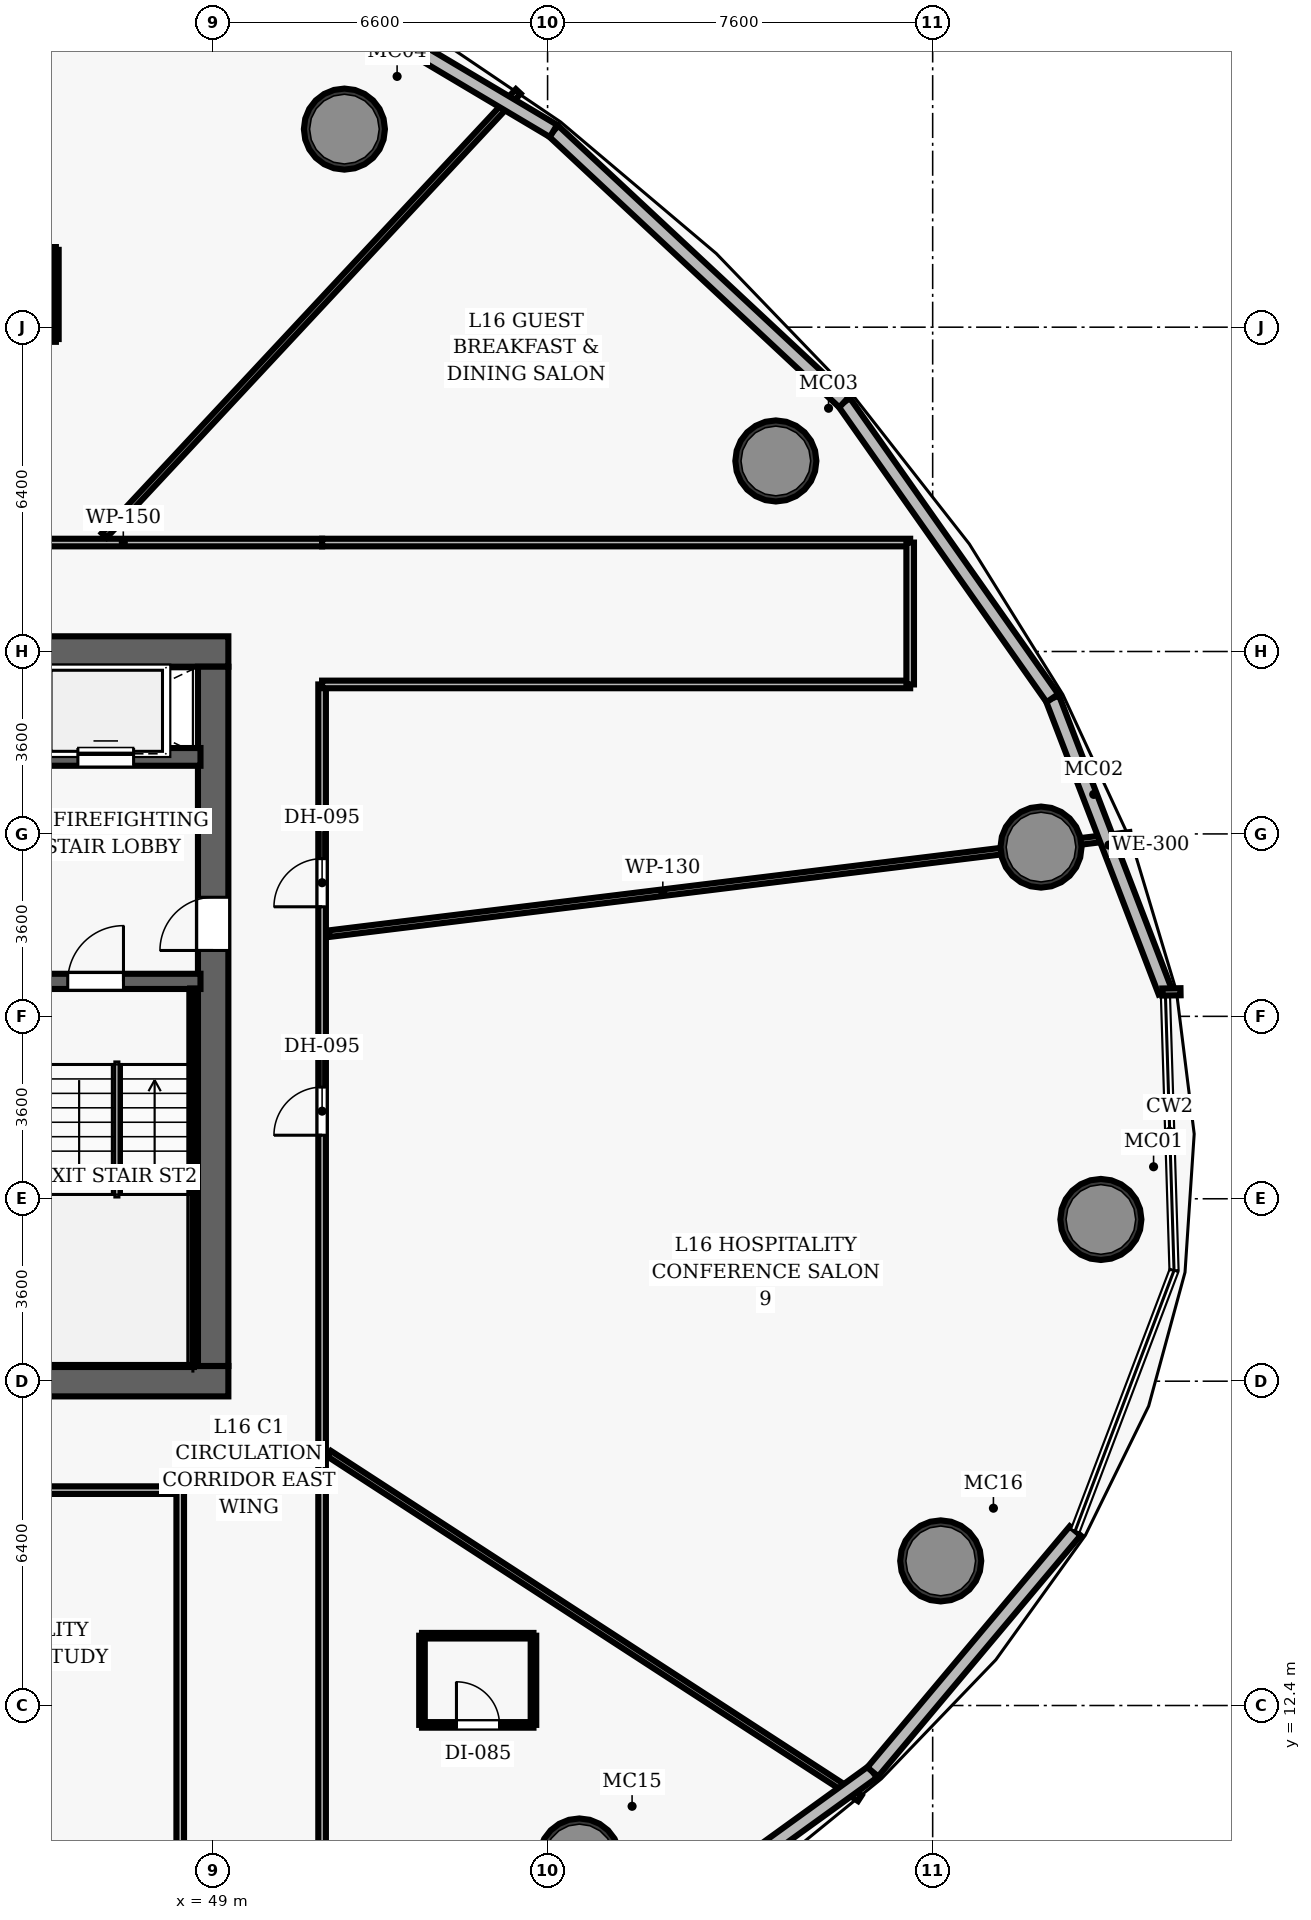
"""IFC4 building model, lengths in metres.
Left out: names, types, materials, properties, quantities, classifications, styles, units other than length and angle.
Written with IfcOpenShell. Run it as: python <this file> out.ifc"""

import sys

from ifc_helpers import new_model, si_unit, direction, frame, frame_2d, origin, origin_2d, place, context, subcontext, project, spatial, rectangle, hollow_circle, extrude, element, fill, save


model = new_model("IFC4")
c1 = context("Model", 3, precision=1e-05, world=origin(), true_north=direction((0.0, 1.0)))
c2 = subcontext(c1, "Body", "Model", "MODEL_VIEW")
j1 = project(units=[si_unit("LENGTHUNIT", "METRE"), si_unit("PLANEANGLEUNIT", "RADIAN")], contexts=[c1])
p1 = place(None, origin())
s1 = spatial("IfcSite", under=j1, at=p1, CompositionType="ELEMENT")
p2 = place(p1, origin())
s2 = spatial("IfcBuilding", under=s1, at=p2, CompositionType="ELEMENT")
p3 = place(p2, frame((0.0, 0.0, 72.9)))
s3 = spatial("IfcBuildingStorey", under=s2, at=p3, CompositionType="ELEMENT", Elevation=72.9)
p4 = place(p3, frame((26.7, 18.8, 0.0), z_axis=(0.0, 0.0, 1.0), x_axis=(1.0, 0.0, 0.0)))
e1 = element("IfcWall", 1, at=p4, inside=s3, PredefinedType="SHEAR", context=c2, shape_type="SweptSolid", body=[
    extrude(rectangle(XDim=22.6, YDim=0.6, at=frame_2d((11.3, 0.0))), origin(), (0.0, 0.0, 1.0), 3.5),
])
p5 = place(p4, frame((14.52, 0.0, 0.0)))
e2 = element("IfcOpeningElement", 2, at=p5, cuts=e1, PredefinedType="OPENING", context=c2, shape_type="SweptSolid", body=[
    extrude(rectangle(XDim=1.05, YDim=2.15, at=frame_2d((0.525, 1.075))), frame((0.0, 0.31, 0.0), z_axis=(0.0, -1.0, 0.0), x_axis=(1.0, 0.0, 0.0)), (0.0, 0.0, 1.0), 0.62),
])
p6 = place(p3, frame((26.7, 33.2, 0.0), z_axis=(0.0, 0.0, 1.0), x_axis=(1.0, 0.0, 0.0)))
e3 = element("IfcWall", 3, at=p6, inside=s3, PredefinedType="SHEAR", context=c2, shape_type="SweptSolid", body=[
    extrude(rectangle(XDim=22.6, YDim=0.6, at=frame_2d((11.3, 0.0))), origin(), (0.0, 0.0, 1.0), 3.5),
])
p7 = place(p6, frame((4.62, 0.0, 0.0)))
e4 = element("IfcOpeningElement", 4, at=p7, cuts=e3, PredefinedType="OPENING", context=c2, shape_type="SweptSolid", body=[
    extrude(rectangle(XDim=1.05, YDim=2.15, at=frame_2d((0.525, 1.075))), frame((0.0, 0.31, 0.0), z_axis=(0.0, -1.0, 0.0), x_axis=(1.0, 0.0, 0.0)), (0.0, 0.0, 1.0), 0.62),
])
p8 = place(p6, frame((14.52, 0.0, 0.0)))
e5 = element("IfcOpeningElement", 5, at=p8, cuts=e3, PredefinedType="OPENING", context=c2, shape_type="SweptSolid", body=[
    extrude(rectangle(XDim=1.05, YDim=2.15, at=frame_2d((0.525, 1.075))), frame((0.0, 0.31, 0.0), z_axis=(0.0, -1.0, 0.0), x_axis=(1.0, 0.0, 0.0)), (0.0, 0.0, 1.0), 0.62),
])
p9 = place(p3, frame((49.0, 19.1, 0.0), z_axis=(0.0, 0.0, 1.0), x_axis=(0.0, 1.0, 0.0)))
e6 = element("IfcWall", 6, at=p9, inside=s3, PredefinedType="SHEAR", context=c2, shape_type="SweptSolid", body=[
    extrude(rectangle(XDim=13.8, YDim=0.6, at=frame_2d((6.9, 0.0))), origin(), (0.0, 0.0, 1.0), 3.5),
])
p10 = place(p9, frame((8.2, 0.0, 0.0)))
e7 = element("IfcOpeningElement", 7, at=p10, cuts=e6, PredefinedType="OPENING", context=c2, shape_type="SweptSolid", body=[
    extrude(rectangle(XDim=1.05, YDim=2.15, at=frame_2d((0.525, 1.075))), frame((0.0, 0.31, 0.0), z_axis=(0.0, -1.0, 0.0), x_axis=(1.0, 0.0, 0.0)), (0.0, 0.0, 1.0), 0.62),
])
for number, where, z_axis, x_axis in (
    (8, (66.52, 21.992, 0.0), (0.0, 0.0, 1.0), (1.0, 0.0, 0.0)),
    (9, (65.339, 29.34, 0.0), (0.0, 0.0, 1.0), (1.0, 0.0, 0.0)),
    (10, (60.105, 36.96, 0.0), (0.0, 0.0, 1.0), (1.0, 0.0, 0.0)),
    (11, (51.59, 43.509, 0.0), (0.0, 0.0, 1.0), (1.0, 0.0, 0.0)),
    (12, (56.228, 9.371, 0.0), (0.0, 0.0, 1.0), (1.0, 0.0, 0.0)),
    (13, (63.359, 15.254, 0.0), (0.0, 0.0, 1.0), (1.0, 0.0, 0.0)),
):
    element("IfcColumn", number, at=place(p3, frame(where, z_axis=z_axis, x_axis=x_axis)), inside=s3, PredefinedType="COLUMN", context=c2, shape_type="SweptSolid", body=[
        extrude(hollow_circle(Radius=0.8, WallThickness=0.06, at=origin_2d()), origin(), (0.0, 0.0, 1.0), 3.5),
    ])
p11 = place(p3, frame((45.08, 26.69, 0.0), z_axis=(0.0, 0.0, 1.0), x_axis=(1.0, 0.0, 0.0)))
e14 = element("IfcWall", 14, at=p11, inside=s3, PredefinedType="SHEAR", context=c2, shape_type="SweptSolid", body=[
    extrude(rectangle(XDim=3.67, YDim=0.3, at=frame_2d((1.835, 0.0))), origin(), (0.0, 0.0, 1.0), 3.5),
])
p12 = place(p11, frame((1.05, 0.0, 0.0)))
e15 = element("IfcOpeningElement", 15, at=p12, cuts=e14, PredefinedType="OPENING", context=c2, shape_type="SweptSolid", body=[
    extrude(rectangle(XDim=1.1, YDim=2.15, at=frame_2d((0.55, 1.075))), frame((0.0, 0.16, 0.0), z_axis=(0.0, -1.0, 0.0), x_axis=(1.0, 0.0, 0.0)), (0.0, 0.0, 1.0), 0.32),
])
p13 = place(p3, frame((48.605, 19.1, 0.0), z_axis=(0.0, 0.0, 1.0), x_axis=(0.0, 1.0, 0.0)))
e16 = element("IfcWall", 16, at=p13, inside=s3, PredefinedType="SHEAR", context=c2, shape_type="SweptSolid", body=[
    extrude(rectangle(XDim=7.45, YDim=0.12, at=frame_2d((3.725, 0.0))), origin(), (0.0, 0.0, 1.0), 3.5),
])
p14 = place(p3, frame((45.51, 19.16, 0.0), z_axis=(0.0, 0.0, 1.0), x_axis=(1.0, 0.0, 0.0)))
e17 = element("IfcWall", 17, at=p14, inside=s3, PredefinedType="SHEAR", context=c2, shape_type="SweptSolid", body=[
    extrude(rectangle(XDim=3.095, YDim=0.12, at=frame_2d((1.547, 0.0))), origin(), (0.0, 0.0, 1.0), 3.5),
])
p15 = place(p3, frame((45.08, 31.12, 0.0), z_axis=(0.0, 0.0, 1.0), x_axis=(1.0, 0.0, 0.0)))
e18 = element("IfcWall", 18, at=p15, inside=s3, PredefinedType="SHEAR", context=c2, shape_type="SweptSolid", body=[
    extrude(rectangle(XDim=3.67, YDim=0.35, at=frame_2d((1.835, 0.0))), origin(), (0.0, 0.0, 1.0), 2.6),
])
p16 = place(p15, frame((1.25, 0.0, 0.0)))
e19 = element("IfcOpeningElement", 19, at=p16, cuts=e18, PredefinedType="OPENING", context=c2, shape_type="SweptSolid", body=[
    extrude(rectangle(XDim=1.1, YDim=2.15, at=frame_2d((0.55, 1.075))), frame((0.0, 0.185, 0.0), z_axis=(0.0, -1.0, 0.0), x_axis=(1.0, 0.0, 0.0)), (0.0, 0.0, 1.0), 0.37),
])
p17 = place(p3, frame((27.65, 35.35, 0.0), z_axis=(0.0, 0.0, 1.0), x_axis=(1.0, 0.0, 0.0)))
e20 = element("IfcWall", 20, at=p17, inside=s3, PredefinedType="PARTITIONING", context=c2, shape_type="SweptSolid", body=[
    extrude(rectangle(XDim=23.5, YDim=0.15, at=frame_2d((11.75, 0.0))), origin(), (0.0, 0.0, 1.0), 2.6),
])
p18 = place(p17, frame((14.553, 0.0, 0.0)))
e21 = element("IfcOpeningElement", 21, at=p18, cuts=e20, PredefinedType="OPENING", context=c2, shape_type="SweptSolid", body=[
    extrude(rectangle(XDim=0.95, YDim=2.15, at=frame_2d((0.475, 1.075))), frame((0.0, 0.085, 0.0), z_axis=(0.0, -1.0, 0.0), x_axis=(1.0, 0.0, 0.0)), (0.0, 0.0, 1.0), 0.17),
])
p19 = place(p17, frame((7.784, 0.0, 0.0)))
e22 = element("IfcOpeningElement", 22, at=p19, cuts=e20, PredefinedType="OPENING", context=c2, shape_type="SweptSolid", body=[
    extrude(rectangle(XDim=0.95, YDim=2.15, at=frame_2d((0.475, 1.075))), frame((0.0, 0.085, 0.0), z_axis=(0.0, -1.0, 0.0), x_axis=(1.0, 0.0, 0.0)), (0.0, 0.0, 1.0), 0.17),
])
p20 = place(p3, frame((24.85, 16.65, 0.0), z_axis=(0.0, 0.0, 1.0), x_axis=(1.0, 0.0, 0.0)))
e23 = element("IfcWall", 23, at=p20, inside=s3, PredefinedType="PARTITIONING", context=c2, shape_type="SweptSolid", body=[
    extrude(rectangle(XDim=23.5, YDim=0.15, at=frame_2d((11.75, 0.0))), origin(), (0.0, 0.0, 1.0), 2.6),
])
p21 = place(p20, frame((6.595, 0.0, 0.0)))
e24 = element("IfcOpeningElement", 24, at=p21, cuts=e23, PredefinedType="OPENING", context=c2, shape_type="SweptSolid", body=[
    extrude(rectangle(XDim=0.95, YDim=2.15, at=frame_2d((0.475, 1.075))), frame((0.0, 0.085, 0.0), z_axis=(0.0, -1.0, 0.0), x_axis=(1.0, 0.0, 0.0)), (0.0, 0.0, 1.0), 0.17),
])
p22 = place(p20, frame((13.99, 0.0, 0.0)))
e25 = element("IfcOpeningElement", 25, at=p22, cuts=e23, PredefinedType="OPENING", context=c2, shape_type="SweptSolid", body=[
    extrude(rectangle(XDim=0.95, YDim=2.15, at=frame_2d((0.475, 1.075))), frame((0.0, 0.085, 0.0), z_axis=(0.0, -1.0, 0.0), x_axis=(1.0, 0.0, 0.0)), (0.0, 0.0, 1.0), 0.17),
])
p23 = place(p20, frame((17.211, 0.0, 0.0)))
e26 = element("IfcOpeningElement", 26, at=p23, cuts=e23, PredefinedType="OPENING", context=c2, shape_type="SweptSolid", body=[
    extrude(rectangle(XDim=0.95, YDim=2.15, at=frame_2d((0.475, 1.075))), frame((0.0, 0.085, 0.0), z_axis=(0.0, -1.0, 0.0), x_axis=(1.0, 0.0, 0.0)), (0.0, 0.0, 1.0), 0.17),
])
p24 = place(p3, frame((51.15, 16.65, 0.0), z_axis=(0.0, 0.0, 1.0), x_axis=(0.0, 1.0, 0.0)))
e27 = element("IfcWall", 27, at=p24, inside=s3, PredefinedType="PARTITIONING", context=c2, shape_type="SweptSolid", body=[
    extrude(rectangle(XDim=15.9, YDim=0.15, at=frame_2d((7.95, 0.0))), origin(), (0.0, 0.0, 1.0), 2.6),
])
p25 = place(p24, frame((11.512, 0.0, 0.0)))
e28 = element("IfcOpeningElement", 28, at=p25, cuts=e27, PredefinedType="OPENING", context=c2, shape_type="SweptSolid", body=[
    extrude(rectangle(XDim=0.95, YDim=2.15, at=frame_2d((0.475, 1.075))), frame((0.0, 0.085, 0.0), z_axis=(0.0, -1.0, 0.0), x_axis=(1.0, 0.0, 0.0)), (0.0, 0.0, 1.0), 0.17),
])
p26 = place(p24, frame((7.004, 0.0, 0.0)))
e29 = element("IfcOpeningElement", 29, at=p26, cuts=e27, PredefinedType="OPENING", context=c2, shape_type="SweptSolid", body=[
    extrude(rectangle(XDim=0.95, YDim=2.15, at=frame_2d((0.475, 1.075))), frame((0.0, 0.085, 0.0), z_axis=(0.0, -1.0, 0.0), x_axis=(1.0, 0.0, 0.0)), (0.0, 0.0, 1.0), 0.17),
])
for number, where, z_axis, x_axis in (
    (30, (51.15, 35.35, 0.0), (0.0, 0.0, 1.0), (1.0, 0.0, 0.0)),
    (31, (51.15, 32.55, 0.0), (0.0, 0.0, 1.0), (1.0, 0.0, 0.0)),
):
    element("IfcWall", number, at=place(p3, frame(where, z_axis=z_axis, x_axis=x_axis)), inside=s3, PredefinedType="PARTITIONING", context=c2, shape_type="SweptSolid", body=[
        extrude(rectangle(XDim=11.606, YDim=0.15, at=frame_2d((5.803, 0.0))), origin(), (0.0, 0.0, 1.0), 2.6),
    ])
p27 = place(p3, frame((62.756, 32.55, 0.0), z_axis=(0.0, 0.0, 1.0), x_axis=(0.0, 1.0, 0.0)))
e32 = element("IfcWall", 32, at=p27, inside=s3, PredefinedType="PARTITIONING", context=c2, shape_type="SweptSolid", body=[
    extrude(rectangle(XDim=2.8, YDim=0.15, at=frame_2d((1.4, 0.0))), origin(), (0.0, 0.0, 1.0), 2.6),
])
for number, where, z_axis, x_axis in (
    (33, (48.35, 6.5, 0.0), (0.0, 0.0, 1.0), (0.0, 1.0, 0.0)),
    (34, (51.15, 6.5, 0.0), (0.0, 0.0, 1.0), (0.0, 1.0, 0.0)),
):
    element("IfcWall", number, at=place(p3, frame(where, z_axis=z_axis, x_axis=x_axis)), inside=s3, PredefinedType="PARTITIONING", context=c2, shape_type="SweptSolid", body=[
        extrude(rectangle(XDim=10.15, YDim=0.15, at=frame_2d((5.075, 0.0))), origin(), (0.0, 0.0, 1.0), 2.6),
    ])
p28 = place(p3, frame((51.29, 27.632, 0.0), z_axis=(0.0, 0.0, 1.0), x_axis=(0.992546840268, 0.121863734862, 0.0)))
e35 = element("IfcWall", 35, at=p28, inside=s3, PredefinedType="PARTITIONING", context=c2, shape_type="SweptSolid", body=[
    extrude(rectangle(XDim=15.919, YDim=0.13, at=frame_2d((7.959, 0.0))), origin(), (0.0, 0.0, 1.0), 2.6),
])
p29 = place(p3, frame((46.85, 35.49, 0.0), z_axis=(0.0, 0.0, 1.0), x_axis=(0.682000932275, 0.731351302983, 0.0)))
e36 = element("IfcWall", 36, at=p29, inside=s3, PredefinedType="PARTITIONING", context=c2, shape_type="SweptSolid", body=[
    extrude(rectangle(XDim=11.982, YDim=0.13, at=frame_2d((5.991, 0.0))), origin(), (0.0, 0.0, 1.0), 2.6),
])
p30 = place(p3, frame((51.29, 17.369, 0.0), z_axis=(0.0, 0.0, 1.0), x_axis=(0.838674055508, -0.544633664602, 0.0)))
e37 = element("IfcWall", 37, at=p30, inside=s3, PredefinedType="PARTITIONING", context=c2, shape_type="SweptSolid", body=[
    extrude(rectangle(XDim=12.486, YDim=0.13, at=frame_2d((6.243, 0.0))), origin(), (0.0, 0.0, 1.0), 2.6),
])
p31 = place(p3, frame((43.696, 39.366, 0.0), z_axis=(0.0, 0.0, 1.0), x_axis=(1.0, 0.0, 0.0)))
e38 = element("IfcWall", 38, at=p31, inside=s3, PredefinedType="PARTITIONING", context=c2, shape_type="SweptSolid", body=[
    extrude(rectangle(XDim=2.2, YDim=0.11, at=frame_2d((1.1, 0.0))), origin(), (0.0, 0.0, 1.0), 2.6),
])
p32 = place(p3, frame((43.696, 41.126, 0.0), z_axis=(0.0, 0.0, 1.0), x_axis=(1.0, 0.0, 0.0)))
e39 = element("IfcWall", 39, at=p32, inside=s3, PredefinedType="PARTITIONING", context=c2, shape_type="SweptSolid", body=[
    extrude(rectangle(XDim=2.2, YDim=0.11, at=frame_2d((1.1, 0.0))), origin(), (0.0, 0.0, 1.0), 2.6),
])
p33 = place(p32, frame((0.68, 0.0, 0.0)))
e40 = element("IfcOpeningElement", 40, at=p33, cuts=e39, PredefinedType="OPENING", context=c2, shape_type="SweptSolid", body=[
    extrude(rectangle(XDim=0.85, YDim=2.1, at=frame_2d((0.425, 1.05))), frame((0.0, 0.065, 0.0), z_axis=(0.0, -1.0, 0.0), x_axis=(1.0, 0.0, 0.0)), (0.0, 0.0, 1.0), 0.13),
])
p34 = place(p3, frame((45.896, 39.366, 0.0), z_axis=(0.0, 0.0, 1.0), x_axis=(0.0, 1.0, 0.0)))
e41 = element("IfcWall", 41, at=p34, inside=s3, PredefinedType="PARTITIONING", context=c2, shape_type="SweptSolid", body=[
    extrude(rectangle(XDim=1.76, YDim=0.11, at=frame_2d((0.88, 0.0))), origin(), (0.0, 0.0, 1.0), 2.6),
])
p35 = place(p3, frame((53.122, 12.017, 0.0), z_axis=(0.0, 0.0, 1.0), x_axis=(1.0, 0.0, 0.0)))
e42 = element("IfcWall", 42, at=p35, inside=s3, PredefinedType="PARTITIONING", context=c2, shape_type="SweptSolid", body=[
    extrude(rectangle(XDim=2.2, YDim=0.11, at=frame_2d((1.1, 0.0))), origin(), (0.0, 0.0, 1.0), 2.6),
])
p36 = place(p35, frame((0.68, 0.0, 0.0)))
e43 = element("IfcOpeningElement", 43, at=p36, cuts=e42, PredefinedType="OPENING", context=c2, shape_type="SweptSolid", body=[
    extrude(rectangle(XDim=0.85, YDim=2.1, at=frame_2d((0.425, 1.05))), frame((0.0, 0.065, 0.0), z_axis=(0.0, -1.0, 0.0), x_axis=(1.0, 0.0, 0.0)), (0.0, 0.0, 1.0), 0.13),
])
p37 = place(p3, frame((53.122, 13.777, 0.0), z_axis=(0.0, 0.0, 1.0), x_axis=(1.0, 0.0, 0.0)))
e44 = element("IfcWall", 44, at=p37, inside=s3, PredefinedType="PARTITIONING", context=c2, shape_type="SweptSolid", body=[
    extrude(rectangle(XDim=2.2, YDim=0.11, at=frame_2d((1.1, 0.0))), origin(), (0.0, 0.0, 1.0), 2.6),
])
for number, where, z_axis, x_axis in (
    (45, (53.122, 12.017, 0.0), (0.0, 0.0, 1.0), (0.0, 1.0, 0.0)),
    (46, (55.322, 12.017, 0.0), (0.0, 0.0, 1.0), (0.0, 1.0, 0.0)),
):
    element("IfcWall", number, at=place(p3, frame(where, z_axis=z_axis, x_axis=x_axis)), inside=s3, PredefinedType="PARTITIONING", context=c2, shape_type="SweptSolid", body=[
        extrude(rectangle(XDim=1.76, YDim=0.11, at=frame_2d((0.88, 0.0))), origin(), (0.0, 0.0, 1.0), 2.6),
    ])
p38 = place(p3, frame((65.563, 32.279, 0.0), z_axis=(0.0, 0.0, 1.0), x_axis=(0.358705168574, -0.933450910353, 0.0)))
e47 = element("IfcWall", 47, at=p38, inside=s3, PredefinedType="SOLIDWALL", context=c2, shape_type="SweptSolid", body=[
    extrude(rectangle(XDim=6.212, YDim=0.28, at=frame_2d((3.106, 0.0))), origin(), (0.0, 0.0, 1.0), 3.25),
])
p39 = place(p3, frame((61.452, 38.121, 0.0), z_axis=(0.0, 0.0, 1.0), x_axis=(0.575543356888, -0.817771266518, 0.0)))
e48 = element("IfcWall", 48, at=p39, inside=s3, PredefinedType="SOLIDWALL", context=c2, shape_type="SweptSolid", body=[
    extrude(rectangle(XDim=7.143, YDim=0.28, at=frame_2d((3.572, 0.0))), origin(), (0.0, 0.0, 1.0), 3.25),
])
p40 = place(p3, frame((55.717, 43.472, 0.0), z_axis=(0.0, 0.0, 1.0), x_axis=(0.731145300825, -0.682221774119, 0.0)))
e49 = element("IfcWall", 49, at=p40, inside=s3, PredefinedType="SOLIDWALL", context=c2, shape_type="SweptSolid", body=[
    extrude(rectangle(XDim=7.845, YDim=0.28, at=frame_2d((3.922, 0.0))), origin(), (0.0, 0.0, 1.0), 3.25),
])
p41 = place(p3, frame((48.693, 47.647, 0.0), z_axis=(0.0, 0.0, 1.0), x_axis=(0.859613214245, -0.510945321825, 0.0)))
e50 = element("IfcWall", 50, at=p41, inside=s3, PredefinedType="SOLIDWALL", context=c2, shape_type="SweptSolid", body=[
    extrude(rectangle(XDim=8.171, YDim=0.28, at=frame_2d((4.085, 0.0))), origin(), (0.0, 0.0, 1.0), 3.25),
])
p42 = place(p3, frame((62.018, 11.089, 0.0), z_axis=(0.0, 0.0, 1.0), x_axis=(-0.810429498951, -0.585836177809, 0.0)))
e51 = element("IfcWall", 51, at=p42, inside=s3, PredefinedType="SOLIDWALL", context=c2, shape_type="SweptSolid", body=[
    extrude(rectangle(XDim=7.143, YDim=0.28, at=frame_2d((3.571, 0.0))), origin(), (0.0, 0.0, 1.0), 3.25),
])
p43 = place(p3, frame((66.012, 15.846, 0.0), z_axis=(0.0, 0.0, 1.0), x_axis=(-0.643067644566, -0.765809378705, 0.0)))
e52 = element("IfcWall", 52, at=p43, inside=s3, PredefinedType="SOLIDWALL", context=c2, shape_type="SweptSolid", body=[
    extrude(rectangle(XDim=6.212, YDim=0.28, at=frame_2d((3.106, 0.0))), origin(), (0.0, 0.0, 1.0), 3.25),
])
p44 = place(p12, origin())
e53 = element("IfcDoor", 53, at=p44, inside=s3, OperationType="SINGLE_SWING_RIGHT", PredefinedType="DOOR", context=c2, shape_type="SweptSolid", body=[
    extrude(rectangle(XDim=1.1, YDim=2.15, at=frame_2d((0.55, 1.075))), frame((0.0, 0.025, 0.0), z_axis=(0.0, -1.0, 0.0), x_axis=(1.0, 0.0, 0.0)), (0.0, 0.0, 1.0), 0.05),
])
fill(e15, e53)
p45 = place(p10, origin())
e54 = element("IfcDoor", 54, at=p45, inside=s3, OperationType="SINGLE_SWING_LEFT", PredefinedType="DOOR", context=c2, shape_type="SweptSolid", body=[
    extrude(rectangle(XDim=1.05, YDim=2.15, at=frame_2d((0.525, 1.075))), frame((0.0, 0.025, 0.0), z_axis=(0.0, -1.0, 0.0), x_axis=(1.0, 0.0, 0.0)), (0.0, 0.0, 1.0), 0.05),
])
fill(e7, e54)
p46 = place(p25, origin())
e55 = element("IfcDoor", 55, at=p46, inside=s3, OperationType="SINGLE_SWING_LEFT", PredefinedType="DOOR", context=c2, shape_type="SweptSolid", body=[
    extrude(rectangle(XDim=0.95, YDim=2.15, at=frame_2d((0.475, 1.075))), frame((0.0, 0.025, 0.0), z_axis=(0.0, -1.0, 0.0), x_axis=(1.0, 0.0, 0.0)), (0.0, 0.0, 1.0), 0.05),
])
fill(e28, e55)
p47 = place(p36, origin())
e56 = element("IfcDoor", 56, at=p47, inside=s3, OperationType="SINGLE_SWING_LEFT", PredefinedType="DOOR", context=c2, shape_type="SweptSolid", body=[
    extrude(rectangle(XDim=0.85, YDim=2.1, at=frame_2d((0.425, 1.05))), frame((0.0, 0.025, 0.0), z_axis=(0.0, -1.0, 0.0), x_axis=(1.0, 0.0, 0.0)), (0.0, 0.0, 1.0), 0.05),
])
fill(e43, e56)
p48 = place(p26, origin())
e57 = element("IfcDoor", 57, at=p48, inside=s3, OperationType="SINGLE_SWING_LEFT", PredefinedType="DOOR", context=c2, shape_type="SweptSolid", body=[
    extrude(rectangle(XDim=0.95, YDim=2.15, at=frame_2d((0.475, 1.075))), frame((0.0, 0.025, 0.0), z_axis=(0.0, -1.0, 0.0), x_axis=(1.0, 0.0, 0.0)), (0.0, 0.0, 1.0), 0.05),
])
fill(e29, e57)
p49 = place(p16, origin())
e58 = element("IfcDoor", 58, at=p49, inside=s3, OperationType="SLIDING_TO_LEFT", PredefinedType="DOOR", context=c2, shape_type="SweptSolid", body=[
    extrude(rectangle(XDim=1.1, YDim=2.15, at=frame_2d((0.55, 1.075))), frame((0.0, 0.025, 0.0), z_axis=(0.0, -1.0, 0.0), x_axis=(1.0, 0.0, 0.0)), (0.0, 0.0, 1.0), 0.05),
])
fill(e19, e58)
save(model, sys.argv[1])
